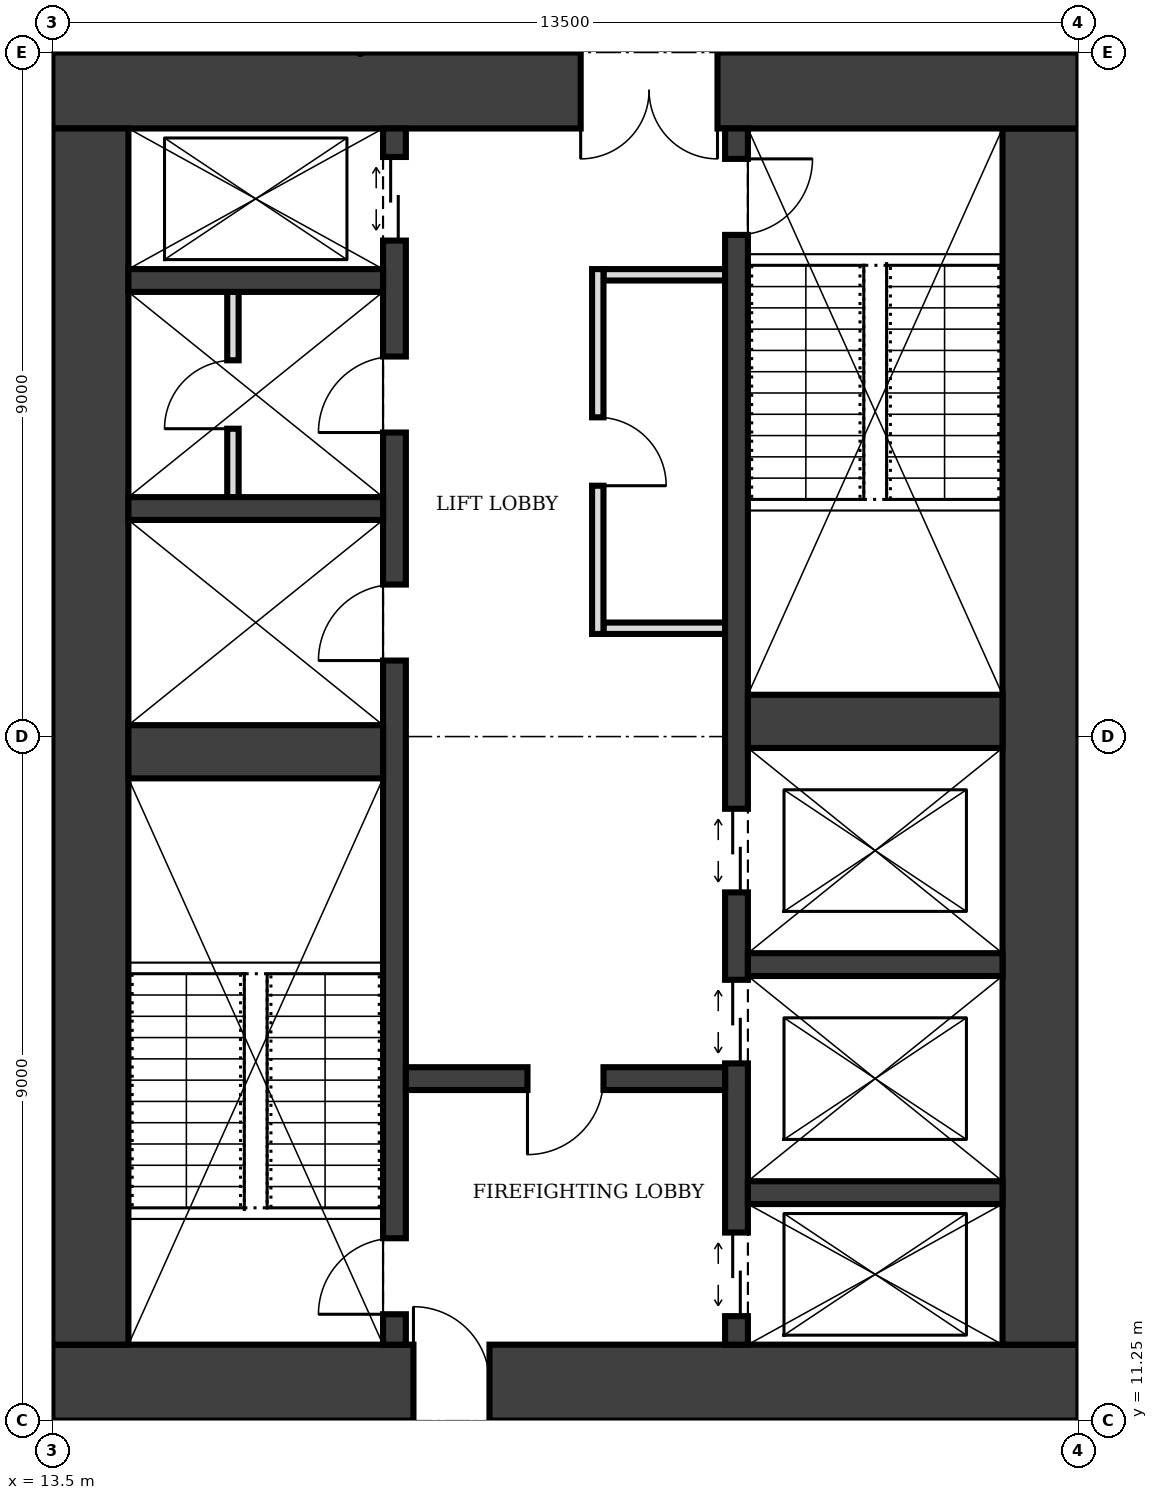
"""IFC4 building model, lengths in metres.
Left out: names, types, materials, properties, quantities, classifications, styles, units other than length and angle.
Written with IfcOpenShell. Run it as: python <this file> out.ifc"""

import sys

from ifc_helpers import new_model, si_unit, direction, frame, frame_2d, origin, place, context, subcontext, project, spatial, rectangle, extrude, element, fill, save


model = new_model("IFC4")
c1 = context("Model", 3, precision=1e-05, world=origin(), true_north=direction((0.0, 1.0)))
c2 = subcontext(c1, "Body", "Model", "MODEL_VIEW")
j1 = project(units=[si_unit("LENGTHUNIT", "METRE"), si_unit("PLANEANGLEUNIT", "RADIAN")], contexts=[c1])
p1 = place(None, origin())
s1 = spatial("IfcSite", under=j1, at=p1, CompositionType="ELEMENT")
p2 = place(p1, origin())
s2 = spatial("IfcBuilding", under=s1, at=p2, CompositionType="ELEMENT")
p3 = place(p2, frame((0.0, 0.0, 285.0)))
s3 = spatial("IfcBuildingStorey", under=s2, at=p3, CompositionType="ELEMENT", Elevation=285.0)
p4 = place(p3, frame((13.5, 11.75, 0.0), z_axis=(0.0, 0.0, 1.0), x_axis=(1.0, 0.0, 0.0)))
e1 = element("IfcWall", 1, at=p4, inside=s3, PredefinedType="SHEAR", context=c2, shape_type="SweptSolid", body=[
    extrude(rectangle(XDim=13.5, YDim=1.0, at=frame_2d((6.75, 0.0))), origin(), (0.0, 0.0, 1.0), 4.0),
])
p5 = place(p4, frame((4.75, 0.0, 0.0)))
e2 = element("IfcOpeningElement", 2, at=p5, cuts=e1, PredefinedType="OPENING", context=c2, shape_type="SweptSolid", body=[
    extrude(rectangle(XDim=1.0, YDim=2.1, at=frame_2d((0.5, 1.05))), frame((0.0, 0.51, 0.0), z_axis=(0.0, -1.0, 0.0), x_axis=(1.0, 0.0, 0.0)), (0.0, 0.0, 1.0), 1.02),
])
p6 = place(p3, frame((26.5, 12.25, 0.0), z_axis=(0.0, 0.0, 1.0), x_axis=(0.0, 1.0, 0.0)))
e3 = element("IfcWall", 3, at=p6, inside=s3, PredefinedType="SHEAR", context=c2, shape_type="SweptSolid", body=[
    extrude(rectangle(XDim=16.0, YDim=1.0, at=frame_2d((8.0, 0.0))), origin(), (0.0, 0.0, 1.0), 4.0),
])
p7 = place(p3, frame((27.0, 28.75, 0.0), z_axis=(0.0, 0.0, 1.0), x_axis=(-1.0, 0.0, 0.0)))
e4 = element("IfcWall", 4, at=p7, inside=s3, PredefinedType="SHEAR", context=c2, shape_type="SweptSolid", body=[
    extrude(rectangle(XDim=13.5, YDim=1.0, at=frame_2d((6.75, 0.0))), origin(), (0.0, 0.0, 1.0), 4.0),
])
p8 = place(p7, frame((4.75, 0.0, 0.0)))
e5 = element("IfcOpeningElement", 5, at=p8, cuts=e4, PredefinedType="OPENING", context=c2, shape_type="SweptSolid", body=[
    extrude(rectangle(XDim=1.8, YDim=2.1, at=frame_2d((0.9, 1.05))), frame((0.0, 0.51, 0.0), z_axis=(0.0, -1.0, 0.0), x_axis=(1.0, 0.0, 0.0)), (0.0, 0.0, 1.0), 1.02),
])
p9 = place(p3, frame((14.0, 28.25, 0.0), z_axis=(0.0, 0.0, 1.0), x_axis=(0.0, -1.0, 0.0)))
e6 = element("IfcWall", 6, at=p9, inside=s3, PredefinedType="SHEAR", context=c2, shape_type="SweptSolid", body=[
    extrude(rectangle(XDim=16.0, YDim=1.0, at=frame_2d((8.0, 0.0))), origin(), (0.0, 0.0, 1.0), 4.0),
])
p10 = place(p3, frame((18.0, 12.25, 0.0), z_axis=(0.0, 0.0, 1.0), x_axis=(0.0, 1.0, 0.0)))
e7 = element("IfcWall", 7, at=p10, inside=s3, PredefinedType="SHEAR", context=c2, shape_type="SweptSolid", body=[
    extrude(rectangle(XDim=16.0, YDim=0.3, at=frame_2d((8.0, 0.0))), origin(), (0.0, 0.0, 1.0), 4.0),
])
p11 = place(p10, frame((0.4, 0.0, 0.0)))
e8 = element("IfcOpeningElement", 8, at=p11, cuts=e7, PredefinedType="OPENING", context=c2, shape_type="SweptSolid", body=[
    extrude(rectangle(XDim=1.0, YDim=2.1, at=frame_2d((0.5, 1.05))), frame((0.0, 0.16, 0.0), z_axis=(0.0, -1.0, 0.0), x_axis=(1.0, 0.0, 0.0)), (0.0, 0.0, 1.0), 0.32),
])
p12 = place(p10, frame((14.525, 0.0, 0.0)))
e9 = element("IfcOpeningElement", 9, at=p12, cuts=e7, PredefinedType="OPENING", context=c2, shape_type="SweptSolid", body=[
    extrude(rectangle(XDim=1.1, YDim=2.1, at=frame_2d((0.55, 1.05))), frame((0.0, 0.16, 0.0), z_axis=(0.0, -1.0, 0.0), x_axis=(1.0, 0.0, 0.0)), (0.0, 0.0, 1.0), 0.32),
])
p13 = place(p10, frame((9.0, 0.0, 0.0)))
e10 = element("IfcOpeningElement", 10, at=p13, cuts=e7, PredefinedType="OPENING", context=c2, shape_type="SweptSolid", body=[
    extrude(rectangle(XDim=1.0, YDim=2.1, at=frame_2d((0.5, 1.05))), frame((0.0, 0.16, 0.0), z_axis=(0.0, -1.0, 0.0), x_axis=(1.0, 0.0, 0.0)), (0.0, 0.0, 1.0), 0.32),
])
p14 = place(p10, frame((12.0, 0.0, 0.0)))
e11 = element("IfcOpeningElement", 11, at=p14, cuts=e7, PredefinedType="OPENING", context=c2, shape_type="SweptSolid", body=[
    extrude(rectangle(XDim=1.0, YDim=2.1, at=frame_2d((0.5, 1.05))), frame((0.0, 0.16, 0.0), z_axis=(0.0, -1.0, 0.0), x_axis=(1.0, 0.0, 0.0)), (0.0, 0.0, 1.0), 0.32),
])
p15 = place(p3, frame((22.5, 12.25, 0.0), z_axis=(0.0, 0.0, 1.0), x_axis=(0.0, 1.0, 0.0)))
e12 = element("IfcWall", 12, at=p15, inside=s3, PredefinedType="SHEAR", context=c2, shape_type="SweptSolid", body=[
    extrude(rectangle(XDim=16.0, YDim=0.3, at=frame_2d((8.0, 0.0))), origin(), (0.0, 0.0, 1.0), 4.0),
])
p16 = place(p15, frame((14.6, 0.0, 0.0)))
e13 = element("IfcOpeningElement", 13, at=p16, cuts=e12, PredefinedType="OPENING", context=c2, shape_type="SweptSolid", body=[
    extrude(rectangle(XDim=1.0, YDim=2.1, at=frame_2d((0.5, 1.05))), frame((0.0, 0.16, 0.0), z_axis=(0.0, -1.0, 0.0), x_axis=(1.0, 0.0, 0.0)), (0.0, 0.0, 1.0), 0.32),
])
p17 = place(p15, frame((0.375, 0.0, 0.0)))
e14 = element("IfcOpeningElement", 14, at=p17, cuts=e12, PredefinedType="OPENING", context=c2, shape_type="SweptSolid", body=[
    extrude(rectangle(XDim=1.1, YDim=2.1, at=frame_2d((0.55, 1.05))), frame((0.0, 0.16, 0.0), z_axis=(0.0, -1.0, 0.0), x_axis=(1.0, 0.0, 0.0)), (0.0, 0.0, 1.0), 0.32),
])
p18 = place(p15, frame((3.7, 0.0, 0.0)))
e15 = element("IfcOpeningElement", 15, at=p18, cuts=e12, PredefinedType="OPENING", context=c2, shape_type="SweptSolid", body=[
    extrude(rectangle(XDim=1.1, YDim=2.1, at=frame_2d((0.55, 1.05))), frame((0.0, 0.16, 0.0), z_axis=(0.0, -1.0, 0.0), x_axis=(1.0, 0.0, 0.0)), (0.0, 0.0, 1.0), 0.32),
])
p19 = place(p15, frame((5.95, 0.0, 0.0)))
e16 = element("IfcOpeningElement", 16, at=p19, cuts=e12, PredefinedType="OPENING", context=c2, shape_type="SweptSolid", body=[
    extrude(rectangle(XDim=1.1, YDim=2.1, at=frame_2d((0.55, 1.05))), frame((0.0, 0.16, 0.0), z_axis=(0.0, -1.0, 0.0), x_axis=(1.0, 0.0, 0.0)), (0.0, 0.0, 1.0), 0.32),
])
p20 = place(p3, frame((14.5, 20.05, 0.0), z_axis=(0.0, 0.0, 1.0), x_axis=(1.0, 0.0, 0.0)))
e17 = element("IfcWall", 17, at=p20, inside=s3, PredefinedType="SHEAR", context=c2, shape_type="SweptSolid", body=[
    extrude(rectangle(XDim=3.35, YDim=0.7, at=frame_2d((1.675, 0.0))), origin(), (0.0, 0.0, 1.0), 4.0),
])
p21 = place(p3, frame((18.15, 15.75, 0.0), z_axis=(0.0, 0.0, 1.0), x_axis=(1.0, 0.0, 0.0)))
e18 = element("IfcWall", 18, at=p21, inside=s3, PredefinedType="SHEAR", context=c2, shape_type="SweptSolid", body=[
    extrude(rectangle(XDim=4.2, YDim=0.3, at=frame_2d((2.1, 0.0))), origin(), (0.0, 0.0, 1.0), 4.0),
])
p22 = place(p21, frame((1.6, 0.0, 0.0)))
e19 = element("IfcOpeningElement", 19, at=p22, cuts=e18, PredefinedType="OPENING", context=c2, shape_type="SweptSolid", body=[
    extrude(rectangle(XDim=1.0, YDim=2.1, at=frame_2d((0.5, 1.05))), frame((0.0, 0.16, 0.0), z_axis=(0.0, -1.0, 0.0), x_axis=(1.0, 0.0, 0.0)), (0.0, 0.0, 1.0), 0.32),
])
for number, where, z_axis, x_axis in (
    (20, (22.65, 14.25, 0.0), (0.0, 0.0, 1.0), (1.0, 0.0, 0.0)),
    (21, (22.65, 17.25, 0.0), (0.0, 0.0, 1.0), (1.0, 0.0, 0.0)),
):
    element("IfcWall", number, at=place(p3, frame(where, z_axis=z_axis, x_axis=x_axis)), inside=s3, PredefinedType="SHEAR", context=c2, shape_type="SweptSolid", body=[
        extrude(rectangle(XDim=3.35, YDim=0.3, at=frame_2d((1.675, 0.0))), origin(), (0.0, 0.0, 1.0), 4.0),
    ])
p23 = place(p3, frame((22.65, 20.45, 0.0), z_axis=(0.0, 0.0, 1.0), x_axis=(1.0, 0.0, 0.0)))
e22 = element("IfcWall", 22, at=p23, inside=s3, PredefinedType="SHEAR", context=c2, shape_type="SweptSolid", body=[
    extrude(rectangle(XDim=3.35, YDim=0.7, at=frame_2d((1.675, 0.0))), origin(), (0.0, 0.0, 1.0), 4.0),
])
for number, where, z_axis, x_axis in (
    (23, (14.5, 23.25, 0.0), (0.0, 0.0, 1.0), (1.0, 0.0, 0.0)),
    (24, (14.5, 26.25, 0.0), (0.0, 0.0, 1.0), (1.0, 0.0, 0.0)),
):
    element("IfcWall", number, at=place(p3, frame(where, z_axis=z_axis, x_axis=x_axis)), inside=s3, PredefinedType="SHEAR", context=c2, shape_type="SweptSolid", body=[
        extrude(rectangle(XDim=3.35, YDim=0.3, at=frame_2d((1.675, 0.0))), origin(), (0.0, 0.0, 1.0), 4.0),
    ])
p24 = place(p3, frame((20.675, 21.6, 0.0), z_axis=(0.0, 0.0, 1.0), x_axis=(0.0, 1.0, 0.0)))
e25 = element("IfcWall", 25, at=p24, inside=s3, PredefinedType="PARTITIONING", context=c2, shape_type="SweptSolid", body=[
    extrude(rectangle(XDim=4.8, YDim=0.15, at=frame_2d((2.4, 0.0))), origin(), (0.0, 0.0, 1.0), 3.75),
])
p25 = place(p24, frame((1.95, 0.0, 0.0)))
e26 = element("IfcOpeningElement", 26, at=p25, cuts=e25, PredefinedType="OPENING", context=c2, shape_type="SweptSolid", body=[
    extrude(rectangle(XDim=0.9, YDim=2.1, at=frame_2d((0.45, 1.05))), frame((0.0, 0.085, 0.0), z_axis=(0.0, -1.0, 0.0), x_axis=(1.0, 0.0, 0.0)), (0.0, 0.0, 1.0), 0.17),
])
for number, where, z_axis, x_axis in (
    (27, (20.75, 21.675, 0.0), (0.0, 0.0, 1.0), (1.0, 0.0, 0.0)),
    (28, (20.75, 26.325, 0.0), (0.0, 0.0, 1.0), (1.0, 0.0, 0.0)),
):
    element("IfcWall", number, at=place(p3, frame(where, z_axis=z_axis, x_axis=x_axis)), inside=s3, PredefinedType="PARTITIONING", context=c2, shape_type="SweptSolid", body=[
        extrude(rectangle(XDim=1.6, YDim=0.15, at=frame_2d((0.8, 0.0))), origin(), (0.0, 0.0, 1.0), 3.75),
    ])
p26 = place(p3, frame((15.875, 23.4, 0.0), z_axis=(0.0, 0.0, 1.0), x_axis=(0.0, 1.0, 0.0)))
e29 = element("IfcWall", 29, at=p26, inside=s3, PredefinedType="PARTITIONING", context=c2, shape_type="SweptSolid", body=[
    extrude(rectangle(XDim=2.7, YDim=0.15, at=frame_2d((1.35, 0.0))), origin(), (0.0, 0.0, 1.0), 3.75),
])
p27 = place(p26, frame((0.9, 0.0, 0.0)))
e30 = element("IfcOpeningElement", 30, at=p27, cuts=e29, PredefinedType="OPENING", context=c2, shape_type="SweptSolid", body=[
    extrude(rectangle(XDim=0.9, YDim=2.1, at=frame_2d((0.45, 1.05))), frame((0.0, 0.085, 0.0), z_axis=(0.0, -1.0, 0.0), x_axis=(1.0, 0.0, 0.0)), (0.0, 0.0, 1.0), 0.17),
])
p28 = place(p5, origin())
e31 = element("IfcDoor", 31, at=p28, inside=s3, OperationType="SINGLE_SWING_LEFT", PredefinedType="DOOR", context=c2, shape_type="SweptSolid", body=[
    extrude(rectangle(XDim=1.0, YDim=2.1, at=frame_2d((0.5, 1.05))), frame((0.0, 0.025, 0.0), z_axis=(0.0, -1.0, 0.0), x_axis=(1.0, 0.0, 0.0)), (0.0, 0.0, 1.0), 0.05),
])
fill(e2, e31)
p29 = place(p8, origin())
e32 = element("IfcDoor", 32, at=p29, inside=s3, OperationType="DOUBLE_DOOR_SINGLE_SWING", PredefinedType="DOOR", context=c2, shape_type="SweptSolid", body=[
    extrude(rectangle(XDim=1.8, YDim=2.1, at=frame_2d((0.9, 1.05))), frame((0.0, 0.025, 0.0), z_axis=(0.0, -1.0, 0.0), x_axis=(1.0, 0.0, 0.0)), (0.0, 0.0, 1.0), 0.05),
])
fill(e5, e32)
p30 = place(p22, frame((1.0, 0.0, 0.0), z_axis=(0.0, 0.0, 1.0), x_axis=(-1.0, 0.0, 0.0)))
e33 = element("IfcDoor", 33, at=p30, inside=s3, OperationType="SINGLE_SWING_RIGHT", PredefinedType="DOOR", context=c2, shape_type="SweptSolid", body=[
    extrude(rectangle(XDim=1.0, YDim=2.1, at=frame_2d((0.5, 1.05))), frame((0.0, 0.025, 0.0), z_axis=(0.0, -1.0, 0.0), x_axis=(1.0, 0.0, 0.0)), (0.0, 0.0, 1.0), 0.05),
])
fill(e19, e33)
p31 = place(p11, origin())
e34 = element("IfcDoor", 34, at=p31, inside=s3, OperationType="SINGLE_SWING_LEFT", PredefinedType="DOOR", context=c2, shape_type="SweptSolid", body=[
    extrude(rectangle(XDim=1.0, YDim=2.1, at=frame_2d((0.5, 1.05))), frame((0.0, 0.025, 0.0), z_axis=(0.0, -1.0, 0.0), x_axis=(1.0, 0.0, 0.0)), (0.0, 0.0, 1.0), 0.05),
])
fill(e8, e34)
p32 = place(p16, frame((1.0, 0.0, 0.0), z_axis=(0.0, 0.0, 1.0), x_axis=(-1.0, 0.0, 0.0)))
e35 = element("IfcDoor", 35, at=p32, inside=s3, OperationType="SINGLE_SWING_LEFT", PredefinedType="DOOR", context=c2, shape_type="SweptSolid", body=[
    extrude(rectangle(XDim=1.0, YDim=2.1, at=frame_2d((0.5, 1.05))), frame((0.0, 0.025, 0.0), z_axis=(0.0, -1.0, 0.0), x_axis=(1.0, 0.0, 0.0)), (0.0, 0.0, 1.0), 0.05),
])
fill(e13, e35)
p33 = place(p17, origin())
e36 = element("IfcDoor", 36, at=p33, inside=s3, OperationType="DOUBLE_DOOR_SLIDING", PredefinedType="DOOR", context=c2, shape_type="SweptSolid", body=[
    extrude(rectangle(XDim=1.1, YDim=2.1, at=frame_2d((0.55, 1.05))), frame((0.0, 0.025, 0.0), z_axis=(0.0, -1.0, 0.0), x_axis=(1.0, 0.0, 0.0)), (0.0, 0.0, 1.0), 0.05),
])
fill(e14, e36)
p34 = place(p12, origin())
e37 = element("IfcDoor", 37, at=p34, inside=s3, OperationType="DOUBLE_DOOR_SLIDING", PredefinedType="DOOR", context=c2, shape_type="SweptSolid", body=[
    extrude(rectangle(XDim=1.1, YDim=2.1, at=frame_2d((0.55, 1.05))), frame((0.0, 0.025, 0.0), z_axis=(0.0, -1.0, 0.0), x_axis=(1.0, 0.0, 0.0)), (0.0, 0.0, 1.0), 0.05),
])
fill(e9, e37)
p35 = place(p18, origin())
e38 = element("IfcDoor", 38, at=p35, inside=s3, OperationType="DOUBLE_DOOR_SLIDING", PredefinedType="DOOR", context=c2, shape_type="SweptSolid", body=[
    extrude(rectangle(XDim=1.1, YDim=2.1, at=frame_2d((0.55, 1.05))), frame((0.0, 0.025, 0.0), z_axis=(0.0, -1.0, 0.0), x_axis=(1.0, 0.0, 0.0)), (0.0, 0.0, 1.0), 0.05),
])
fill(e15, e38)
p36 = place(p19, origin())
e39 = element("IfcDoor", 39, at=p36, inside=s3, OperationType="DOUBLE_DOOR_SLIDING", PredefinedType="DOOR", context=c2, shape_type="SweptSolid", body=[
    extrude(rectangle(XDim=1.1, YDim=2.1, at=frame_2d((0.55, 1.05))), frame((0.0, 0.025, 0.0), z_axis=(0.0, -1.0, 0.0), x_axis=(1.0, 0.0, 0.0)), (0.0, 0.0, 1.0), 0.05),
])
fill(e16, e39)
p37 = place(p25, frame((0.9, 0.0, 0.0), z_axis=(0.0, 0.0, 1.0), x_axis=(-1.0, 0.0, 0.0)))
e40 = element("IfcDoor", 40, at=p37, inside=s3, OperationType="SINGLE_SWING_RIGHT", PredefinedType="DOOR", context=c2, shape_type="SweptSolid", body=[
    extrude(rectangle(XDim=0.9, YDim=2.1, at=frame_2d((0.45, 1.05))), frame((0.0, 0.025, 0.0), z_axis=(0.0, -1.0, 0.0), x_axis=(1.0, 0.0, 0.0)), (0.0, 0.0, 1.0), 0.05),
])
fill(e26, e40)
p38 = place(p13, origin())
e41 = element("IfcDoor", 41, at=p38, inside=s3, OperationType="SINGLE_SWING_LEFT", PredefinedType="DOOR", context=c2, shape_type="SweptSolid", body=[
    extrude(rectangle(XDim=1.0, YDim=2.1, at=frame_2d((0.5, 1.05))), frame((0.0, 0.025, 0.0), z_axis=(0.0, -1.0, 0.0), x_axis=(1.0, 0.0, 0.0)), (0.0, 0.0, 1.0), 0.05),
])
fill(e10, e41)
p39 = place(p14, origin())
e42 = element("IfcDoor", 42, at=p39, inside=s3, OperationType="SINGLE_SWING_LEFT", PredefinedType="DOOR", context=c2, shape_type="SweptSolid", body=[
    extrude(rectangle(XDim=1.0, YDim=2.1, at=frame_2d((0.5, 1.05))), frame((0.0, 0.025, 0.0), z_axis=(0.0, -1.0, 0.0), x_axis=(1.0, 0.0, 0.0)), (0.0, 0.0, 1.0), 0.05),
])
fill(e11, e42)
p40 = place(p27, origin())
e43 = element("IfcDoor", 43, at=p40, inside=s3, OperationType="SINGLE_SWING_LEFT", PredefinedType="DOOR", context=c2, shape_type="SweptSolid", body=[
    extrude(rectangle(XDim=0.9, YDim=2.1, at=frame_2d((0.45, 1.05))), frame((0.0, 0.025, 0.0), z_axis=(0.0, -1.0, 0.0), x_axis=(1.0, 0.0, 0.0)), (0.0, 0.0, 1.0), 0.05),
])
fill(e30, e43)
save(model, sys.argv[1])
